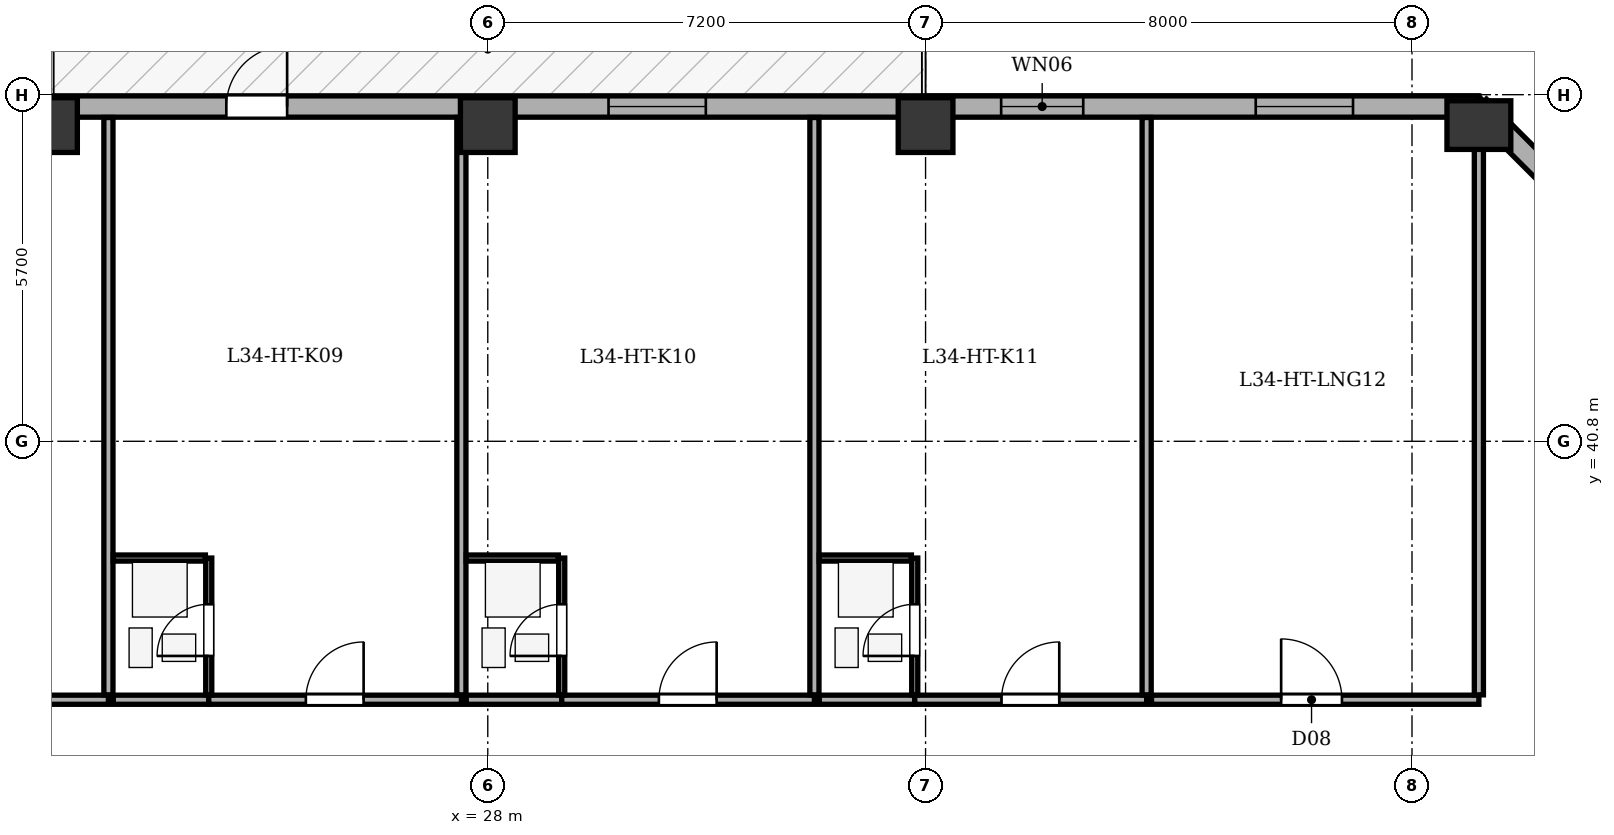
"""IFC4 building model, lengths in metres.
Left out: names, types, materials, properties, quantities, classifications, styles, units other than length and angle.
Written with IfcOpenShell. Run it as: python <this file> out.ifc"""

import sys

from ifc_helpers import new_model, si_unit, direction, frame, frame_2d, origin, origin_2d, place, context, subcontext, project, spatial, rectangle, extrude, element, fill, save


model = new_model("IFC4")
c1 = context("Model", 3, precision=1e-05, world=origin(), true_north=direction((0.0, 1.0)))
c2 = subcontext(c1, "Body", "Model", "MODEL_VIEW")
j1 = project(units=[si_unit("LENGTHUNIT", "METRE"), si_unit("PLANEANGLEUNIT", "RADIAN")], contexts=[c1])
p1 = place(None, origin())
s1 = spatial("IfcSite", under=j1, at=p1, CompositionType="ELEMENT")
p2 = place(p1, origin())
s2 = spatial("IfcBuilding", under=s1, at=p2, CompositionType="ELEMENT")
p3 = place(p2, frame((0.0, 0.0, 137.8)))
s3 = spatial("IfcBuildingStorey", under=s2, at=p3, CompositionType="ELEMENT", Elevation=137.8)
for number, where, z_axis, x_axis in (
    (1, (20.8, 46.0, 0.0), (0.0, 0.0, 1.0), (1.0, 0.0, 0.0)),
    (2, (28.0, 46.0, 0.0), (0.0, 0.0, 1.0), (1.0, 0.0, 0.0)),
    (3, (35.2, 46.0, 0.0), (0.0, 0.0, 1.0), (1.0, 0.0, 0.0)),
):
    element("IfcColumn", number, at=place(p3, frame(where, z_axis=z_axis, x_axis=x_axis)), inside=s3, PredefinedType="COLUMN", context=c2, shape_type="SweptSolid", body=[
        extrude(rectangle(XDim=0.9, YDim=0.9, at=origin_2d()), origin(), (0.0, 0.0, 1.0), 3.5),
    ])
p4 = place(p3, frame((44.3, 46.0, 0.0), z_axis=(0.0, 0.0, 1.0), x_axis=(1.0, 0.0, 0.0)))
e4 = element("IfcColumn", 4, at=p4, inside=s3, PredefinedType="COLUMN", context=c2, shape_type="SweptSolid", body=[
    extrude(rectangle(XDim=0.8, YDim=1.05, at=origin_2d()), origin(), (0.0, 0.0, 1.0), 3.5),
])
p5 = place(p3, frame((9.3, 46.305, 0.0), z_axis=(0.0, 0.0, 1.0), x_axis=(1.0, 0.0, 0.0)))
e5 = element("IfcWall", 5, at=p5, inside=s3, PredefinedType="STANDARD", context=c2, shape_type="SweptSolid", body=[
    extrude(rectangle(XDim=35.0, YDim=0.35, at=frame_2d((17.5, 0.0))), origin(), (0.0, 0.0, 1.0), 2.435),
])
p6 = place(p5, frame((14.4, 0.0, 0.0)))
e6 = element("IfcOpeningElement", 6, at=p6, cuts=e5, PredefinedType="OPENING", context=c2, shape_type="SweptSolid", body=[
    extrude(rectangle(XDim=1.0, YDim=2.02, at=frame_2d((0.5, 1.01))), frame((0.0, 0.185, 0.0), z_axis=(0.0, -1.0, 0.0), x_axis=(1.0, 0.0, 0.0)), (0.0, 0.0, 1.0), 0.37),
])
p7 = place(p5, frame((2.8, 0.0, 0.75)))
e7 = element("IfcOpeningElement", 7, at=p7, cuts=e5, PredefinedType="OPENING", context=c2, shape_type="SweptSolid", body=[
    extrude(rectangle(XDim=1.6, YDim=1.565, at=frame_2d((0.8, 0.782))), frame((0.0, 0.185, 0.0), z_axis=(0.0, -1.0, 0.0), x_axis=(1.0, 0.0, 0.0)), (0.0, 0.0, 1.0), 0.37),
])
p8 = place(p5, frame((8.178, 0.0, 0.75)))
e8 = element("IfcOpeningElement", 8, at=p8, cuts=e5, PredefinedType="OPENING", context=c2, shape_type="SweptSolid", body=[
    extrude(rectangle(XDim=1.6, YDim=1.565, at=frame_2d((0.8, 0.782))), frame((0.0, 0.185, 0.0), z_axis=(0.0, -1.0, 0.0), x_axis=(1.0, 0.0, 0.0)), (0.0, 0.0, 1.0), 0.37),
])
p9 = place(p5, frame((20.686, 0.0, 0.75)))
e9 = element("IfcOpeningElement", 9, at=p9, cuts=e5, PredefinedType="OPENING", context=c2, shape_type="SweptSolid", body=[
    extrude(rectangle(XDim=1.6, YDim=1.565, at=frame_2d((0.8, 0.782))), frame((0.0, 0.185, 0.0), z_axis=(0.0, -1.0, 0.0), x_axis=(1.0, 0.0, 0.0)), (0.0, 0.0, 1.0), 0.37),
])
p10 = place(p5, frame((27.143, 0.0, 0.75)))
e10 = element("IfcOpeningElement", 10, at=p10, cuts=e5, PredefinedType="OPENING", context=c2, shape_type="SweptSolid", body=[
    extrude(rectangle(XDim=1.35, YDim=1.565, at=frame_2d((0.675, 0.782))), frame((0.0, 0.185, 0.0), z_axis=(0.0, -1.0, 0.0), x_axis=(1.0, 0.0, 0.0)), (0.0, 0.0, 1.0), 0.37),
])
p11 = place(p5, frame((31.33, 0.0, 0.75)))
e11 = element("IfcOpeningElement", 11, at=p11, cuts=e5, PredefinedType="OPENING", context=c2, shape_type="SweptSolid", body=[
    extrude(rectangle(XDim=1.6, YDim=1.565, at=frame_2d((0.8, 0.782))), frame((0.0, 0.185, 0.0), z_axis=(0.0, -1.0, 0.0), x_axis=(1.0, 0.0, 0.0)), (0.0, 0.0, 1.0), 0.37),
])
p12 = place(p3, frame((44.3, 46.305, 0.0), z_axis=(0.0, 0.0, 1.0), x_axis=(0.707106781187, -0.707106781187, 0.0)))
e12 = element("IfcWall", 12, at=p12, inside=s3, PredefinedType="STANDARD", context=c2, shape_type="SweptSolid", body=[
    extrude(rectangle(XDim=6.795, YDim=0.35, at=frame_2d((3.397, 0.0))), origin(), (0.0, 0.0, 1.0), 2.435),
])
p13 = place(p12, frame((2.698, 0.0, 0.75)))
e13 = element("IfcOpeningElement", 13, at=p13, cuts=e12, PredefinedType="OPENING", context=c2, shape_type="SweptSolid", body=[
    extrude(rectangle(XDim=1.4, YDim=1.565, at=frame_2d((0.7, 0.782))), frame((0.0, 0.185, 0.0), z_axis=(0.0, -1.0, 0.0), x_axis=(1.0, 0.0, 0.0)), (0.0, 0.0, 1.0), 0.37),
])
p14 = place(p3, frame((17.606, 36.55, 0.0), z_axis=(0.0, 0.0, 1.0), x_axis=(1.0, 0.0, 0.0)))
e14 = element("IfcWall", 14, at=p14, inside=s3, PredefinedType="PARTITIONING", context=c2, shape_type="SweptSolid", body=[
    extrude(rectangle(XDim=4.155, YDim=0.15, at=frame_2d((2.078, 0.0))), origin(), (0.0, 0.0, 1.0), 3.05),
])
p15 = place(p14, frame((1.597, 0.0, 0.0)))
e15 = element("IfcOpeningElement", 15, at=p15, cuts=e14, PredefinedType="OPENING", context=c2, shape_type="SweptSolid", body=[
    extrude(rectangle(XDim=0.95, YDim=2.1, at=frame_2d((0.475, 1.05))), frame((0.0, 0.085, 0.0), z_axis=(0.0, -1.0, 0.0), x_axis=(1.0, 0.0, 0.0)), (0.0, 0.0, 1.0), 0.17),
])
p16 = place(p3, frame((21.761, 36.63, 0.0), z_axis=(0.0, 0.0, 1.0), x_axis=(0.0, 1.0, 0.0)))
e16 = element("IfcWall", 16, at=p16, inside=s3, PredefinedType="PARTITIONING", context=c2, shape_type="SweptSolid", body=[
    extrude(rectangle(XDim=9.495, YDim=0.15, at=frame_2d((4.748, 0.0))), origin(), (0.0, 0.0, 1.0), 3.05),
])
p17 = place(p3, frame((21.841, 36.55, 0.0), z_axis=(0.0, 0.0, 1.0), x_axis=(1.0, 0.0, 0.0)))
e17 = element("IfcWall", 17, at=p17, inside=s3, PredefinedType="PARTITIONING", context=c2, shape_type="SweptSolid", body=[
    extrude(rectangle(XDim=1.57, YDim=0.15, at=frame_2d((0.785, 0.0))), origin(), (0.0, 0.0, 1.0), 3.05),
])
p18 = place(p3, frame((23.411, 36.55, 0.0), z_axis=(0.0, 0.0, 1.0), x_axis=(1.0, 0.0, 0.0)))
e18 = element("IfcWall", 18, at=p18, inside=s3, PredefinedType="PARTITIONING", context=c2, shape_type="SweptSolid", body=[
    extrude(rectangle(XDim=4.155, YDim=0.15, at=frame_2d((2.078, 0.0))), origin(), (0.0, 0.0, 1.0), 3.05),
])
p19 = place(p18, frame((1.597, 0.0, 0.0)))
e19 = element("IfcOpeningElement", 19, at=p19, cuts=e18, PredefinedType="OPENING", context=c2, shape_type="SweptSolid", body=[
    extrude(rectangle(XDim=0.95, YDim=2.1, at=frame_2d((0.475, 1.05))), frame((0.0, 0.085, 0.0), z_axis=(0.0, -1.0, 0.0), x_axis=(1.0, 0.0, 0.0)), (0.0, 0.0, 1.0), 0.17),
])
p20 = place(p3, frame((23.411, 36.63, 0.0), z_axis=(0.0, 0.0, 1.0), x_axis=(0.0, 1.0, 0.0)))
e20 = element("IfcWall", 20, at=p20, inside=s3, PredefinedType="PARTITIONING", context=c2, shape_type="SweptSolid", body=[
    extrude(rectangle(XDim=2.25, YDim=0.1, at=frame_2d((1.125, 0.0))), origin(), (0.0, 0.0, 1.0), 3.05),
])
p21 = place(p20, frame((0.64, 0.0, 0.0)))
e21 = element("IfcOpeningElement", 21, at=p21, cuts=e20, PredefinedType="OPENING", context=c2, shape_type="SweptSolid", body=[
    extrude(rectangle(XDim=0.85, YDim=2.05, at=frame_2d((0.425, 1.025))), frame((0.0, 0.06, 0.0), z_axis=(0.0, -1.0, 0.0), x_axis=(1.0, 0.0, 0.0)), (0.0, 0.0, 1.0), 0.12),
])
p22 = place(p3, frame((21.841, 38.88, 0.0), z_axis=(0.0, 0.0, 1.0), x_axis=(1.0, 0.0, 0.0)))
e22 = element("IfcWall", 22, at=p22, inside=s3, PredefinedType="PARTITIONING", context=c2, shape_type="SweptSolid", body=[
    extrude(rectangle(XDim=1.515, YDim=0.1, at=frame_2d((0.757, 0.0))), origin(), (0.0, 0.0, 1.0), 3.05),
])
p23 = place(p3, frame((27.566, 36.63, 0.0), z_axis=(0.0, 0.0, 1.0), x_axis=(0.0, 1.0, 0.0)))
e23 = element("IfcWall", 23, at=p23, inside=s3, PredefinedType="PARTITIONING", context=c2, shape_type="SweptSolid", body=[
    extrude(rectangle(XDim=9.495, YDim=0.15, at=frame_2d((4.748, 0.0))), origin(), (0.0, 0.0, 1.0), 3.05),
])
p24 = place(p3, frame((27.646, 36.55, 0.0), z_axis=(0.0, 0.0, 1.0), x_axis=(1.0, 0.0, 0.0)))
e24 = element("IfcWall", 24, at=p24, inside=s3, PredefinedType="PARTITIONING", context=c2, shape_type="SweptSolid", body=[
    extrude(rectangle(XDim=1.57, YDim=0.15, at=frame_2d((0.785, 0.0))), origin(), (0.0, 0.0, 1.0), 3.05),
])
p25 = place(p3, frame((29.216, 36.55, 0.0), z_axis=(0.0, 0.0, 1.0), x_axis=(1.0, 0.0, 0.0)))
e25 = element("IfcWall", 25, at=p25, inside=s3, PredefinedType="PARTITIONING", context=c2, shape_type="SweptSolid", body=[
    extrude(rectangle(XDim=4.156, YDim=0.15, at=frame_2d((2.078, 0.0))), origin(), (0.0, 0.0, 1.0), 3.05),
])
p26 = place(p25, frame((1.598, 0.0, 0.0)))
e26 = element("IfcOpeningElement", 26, at=p26, cuts=e25, PredefinedType="OPENING", context=c2, shape_type="SweptSolid", body=[
    extrude(rectangle(XDim=0.95, YDim=2.1, at=frame_2d((0.475, 1.05))), frame((0.0, 0.085, 0.0), z_axis=(0.0, -1.0, 0.0), x_axis=(1.0, 0.0, 0.0)), (0.0, 0.0, 1.0), 0.17),
])
p27 = place(p3, frame((29.216, 36.63, 0.0), z_axis=(0.0, 0.0, 1.0), x_axis=(0.0, 1.0, 0.0)))
e27 = element("IfcWall", 27, at=p27, inside=s3, PredefinedType="PARTITIONING", context=c2, shape_type="SweptSolid", body=[
    extrude(rectangle(XDim=2.25, YDim=0.1, at=frame_2d((1.125, 0.0))), origin(), (0.0, 0.0, 1.0), 3.05),
])
p28 = place(p27, frame((0.64, 0.0, 0.0)))
e28 = element("IfcOpeningElement", 28, at=p28, cuts=e27, PredefinedType="OPENING", context=c2, shape_type="SweptSolid", body=[
    extrude(rectangle(XDim=0.85, YDim=2.05, at=frame_2d((0.425, 1.025))), frame((0.0, 0.06, 0.0), z_axis=(0.0, -1.0, 0.0), x_axis=(1.0, 0.0, 0.0)), (0.0, 0.0, 1.0), 0.12),
])
p29 = place(p3, frame((27.646, 38.88, 0.0), z_axis=(0.0, 0.0, 1.0), x_axis=(1.0, 0.0, 0.0)))
e29 = element("IfcWall", 29, at=p29, inside=s3, PredefinedType="PARTITIONING", context=c2, shape_type="SweptSolid", body=[
    extrude(rectangle(XDim=1.515, YDim=0.1, at=frame_2d((0.757, 0.0))), origin(), (0.0, 0.0, 1.0), 3.05),
])
p30 = place(p3, frame((33.372, 36.63, 0.0), z_axis=(0.0, 0.0, 1.0), x_axis=(0.0, 1.0, 0.0)))
e30 = element("IfcWall", 30, at=p30, inside=s3, PredefinedType="PARTITIONING", context=c2, shape_type="SweptSolid", body=[
    extrude(rectangle(XDim=9.495, YDim=0.15, at=frame_2d((4.748, 0.0))), origin(), (0.0, 0.0, 1.0), 2.485),
])
p31 = place(p3, frame((33.452, 36.55, 0.0), z_axis=(0.0, 0.0, 1.0), x_axis=(1.0, 0.0, 0.0)))
e31 = element("IfcWall", 31, at=p31, inside=s3, PredefinedType="PARTITIONING", context=c2, shape_type="SweptSolid", body=[
    extrude(rectangle(XDim=1.57, YDim=0.15, at=frame_2d((0.785, 0.0))), origin(), (0.0, 0.0, 1.0), 3.05),
])
p32 = place(p3, frame((35.022, 36.55, 0.0), z_axis=(0.0, 0.0, 1.0), x_axis=(1.0, 0.0, 0.0)))
e32 = element("IfcWall", 32, at=p32, inside=s3, PredefinedType="PARTITIONING", context=c2, shape_type="SweptSolid", body=[
    extrude(rectangle(XDim=3.814, YDim=0.15, at=frame_2d((1.907, 0.0))), origin(), (0.0, 0.0, 1.0), 3.05),
])
p33 = place(p32, frame((1.427, 0.0, 0.0)))
e33 = element("IfcOpeningElement", 33, at=p33, cuts=e32, PredefinedType="OPENING", context=c2, shape_type="SweptSolid", body=[
    extrude(rectangle(XDim=0.95, YDim=2.1, at=frame_2d((0.475, 1.05))), frame((0.0, 0.085, 0.0), z_axis=(0.0, -1.0, 0.0), x_axis=(1.0, 0.0, 0.0)), (0.0, 0.0, 1.0), 0.17),
])
p34 = place(p3, frame((35.022, 36.63, 0.0), z_axis=(0.0, 0.0, 1.0), x_axis=(0.0, 1.0, 0.0)))
e34 = element("IfcWall", 34, at=p34, inside=s3, PredefinedType="PARTITIONING", context=c2, shape_type="SweptSolid", body=[
    extrude(rectangle(XDim=2.25, YDim=0.1, at=frame_2d((1.125, 0.0))), origin(), (0.0, 0.0, 1.0), 2.235),
])
p35 = place(p34, frame((0.64, 0.0, 0.0)))
e35 = element("IfcOpeningElement", 35, at=p35, cuts=e34, PredefinedType="OPENING", context=c2, shape_type="SweptSolid", body=[
    extrude(rectangle(XDim=0.85, YDim=2.05, at=frame_2d((0.425, 1.025))), frame((0.0, 0.06, 0.0), z_axis=(0.0, -1.0, 0.0), x_axis=(1.0, 0.0, 0.0)), (0.0, 0.0, 1.0), 0.12),
])
p36 = place(p3, frame((33.452, 38.88, 0.0), z_axis=(0.0, 0.0, 1.0), x_axis=(1.0, 0.0, 0.0)))
e36 = element("IfcWall", 36, at=p36, inside=s3, PredefinedType="PARTITIONING", context=c2, shape_type="SweptSolid", body=[
    extrude(rectangle(XDim=1.515, YDim=0.1, at=frame_2d((0.758, 0.0))), origin(), (0.0, 0.0, 1.0), 3.05),
])
p37 = place(p3, frame((38.836, 36.63, 0.0), z_axis=(0.0, 0.0, 1.0), x_axis=(0.0, 1.0, 0.0)))
e37 = element("IfcWall", 37, at=p37, inside=s3, PredefinedType="PARTITIONING", context=c2, shape_type="SweptSolid", body=[
    extrude(rectangle(XDim=9.495, YDim=0.15, at=frame_2d((4.748, 0.0))), origin(), (0.0, 0.0, 1.0), 3.05),
])
p38 = place(p3, frame((38.916, 36.55, 0.0), z_axis=(0.0, 0.0, 1.0), x_axis=(1.0, 0.0, 0.0)))
e38 = element("IfcWall", 38, at=p38, inside=s3, PredefinedType="PARTITIONING", context=c2, shape_type="SweptSolid", body=[
    extrude(rectangle(XDim=5.384, YDim=0.15, at=frame_2d((2.692, 0.0))), origin(), (0.0, 0.0, 1.0), 3.05),
])
p39 = place(p38, frame((2.132, 0.0, 0.0)))
e39 = element("IfcOpeningElement", 39, at=p39, cuts=e38, PredefinedType="OPENING", context=c2, shape_type="SweptSolid", body=[
    extrude(rectangle(XDim=1.0, YDim=2.1, at=frame_2d((0.5, 1.05))), frame((0.0, 0.085, 0.0), z_axis=(0.0, -1.0, 0.0), x_axis=(1.0, 0.0, 0.0)), (0.0, 0.0, 1.0), 0.17),
])
p40 = place(p3, frame((44.3, 36.63, 0.0), z_axis=(0.0, 0.0, 1.0), x_axis=(0.0, 1.0, 0.0)))
e40 = element("IfcWall", 40, at=p40, inside=s3, PredefinedType="PARTITIONING", context=c2, shape_type="SweptSolid", body=[
    extrude(rectangle(XDim=9.495, YDim=0.15, at=frame_2d((4.748, 0.0))), origin(), (0.0, 0.0, 1.0), 3.05),
])
p41 = place(p6, origin())
e41 = element("IfcDoor", 41, at=p41, inside=s3, OperationType="SINGLE_SWING_RIGHT", PredefinedType="DOOR", context=c2, shape_type="SweptSolid", body=[
    extrude(rectangle(XDim=1.0, YDim=2.02, at=frame_2d((0.5, 1.01))), frame((0.0, 0.025, 0.0), z_axis=(0.0, -1.0, 0.0), x_axis=(1.0, 0.0, 0.0)), (0.0, 0.0, 1.0), 0.05),
])
fill(e6, e41)
p42 = place(p9, origin())
e42 = element("IfcWindow", 42, at=p42, inside=s3, PartitioningType="SINGLE_PANEL", PredefinedType="WINDOW", context=c2, shape_type="SweptSolid", body=[
    extrude(rectangle(XDim=1.6, YDim=1.565, at=frame_2d((0.8, 0.782))), frame((0.0, -0.01, 0.0), z_axis=(0.0, -1.0, 0.0), x_axis=(1.0, 0.0, 0.0)), (0.0, 0.0, 1.0), 0.06),
])
fill(e9, e42)
p43 = place(p10, origin())
e43 = element("IfcWindow", 43, at=p43, inside=s3, PartitioningType="SINGLE_PANEL", PredefinedType="WINDOW", context=c2, shape_type="SweptSolid", body=[
    extrude(rectangle(XDim=1.35, YDim=1.565, at=frame_2d((0.675, 0.782))), frame((0.0, -0.01, 0.0), z_axis=(0.0, -1.0, 0.0), x_axis=(1.0, 0.0, 0.0)), (0.0, 0.0, 1.0), 0.06),
])
fill(e10, e43)
p44 = place(p11, origin())
e44 = element("IfcWindow", 44, at=p44, inside=s3, PartitioningType="SINGLE_PANEL", PredefinedType="WINDOW", context=c2, shape_type="SweptSolid", body=[
    extrude(rectangle(XDim=1.6, YDim=1.565, at=frame_2d((0.8, 0.782))), frame((0.0, -0.01, 0.0), z_axis=(0.0, -1.0, 0.0), x_axis=(1.0, 0.0, 0.0)), (0.0, 0.0, 1.0), 0.06),
])
fill(e11, e44)
p45 = place(p21, origin())
e45 = element("IfcDoor", 45, at=p45, inside=s3, OperationType="SINGLE_SWING_LEFT", PredefinedType="DOOR", context=c2, shape_type="SweptSolid", body=[
    extrude(rectangle(XDim=0.85, YDim=2.05, at=frame_2d((0.425, 1.025))), frame((0.0, 0.025, 0.0), z_axis=(0.0, -1.0, 0.0), x_axis=(1.0, 0.0, 0.0)), (0.0, 0.0, 1.0), 0.05),
])
fill(e21, e45)
p46 = place(p19, origin())
e46 = element("IfcDoor", 46, at=p46, inside=s3, OperationType="SINGLE_SWING_RIGHT", PredefinedType="DOOR", context=c2, shape_type="SweptSolid", body=[
    extrude(rectangle(XDim=0.95, YDim=2.1, at=frame_2d((0.475, 1.05))), frame((0.0, 0.025, 0.0), z_axis=(0.0, -1.0, 0.0), x_axis=(1.0, 0.0, 0.0)), (0.0, 0.0, 1.0), 0.05),
])
fill(e19, e46)
p47 = place(p28, origin())
e47 = element("IfcDoor", 47, at=p47, inside=s3, OperationType="SINGLE_SWING_LEFT", PredefinedType="DOOR", context=c2, shape_type="SweptSolid", body=[
    extrude(rectangle(XDim=0.85, YDim=2.05, at=frame_2d((0.425, 1.025))), frame((0.0, 0.025, 0.0), z_axis=(0.0, -1.0, 0.0), x_axis=(1.0, 0.0, 0.0)), (0.0, 0.0, 1.0), 0.05),
])
fill(e28, e47)
p48 = place(p26, origin())
e48 = element("IfcDoor", 48, at=p48, inside=s3, OperationType="SINGLE_SWING_RIGHT", PredefinedType="DOOR", context=c2, shape_type="SweptSolid", body=[
    extrude(rectangle(XDim=0.95, YDim=2.1, at=frame_2d((0.475, 1.05))), frame((0.0, 0.025, 0.0), z_axis=(0.0, -1.0, 0.0), x_axis=(1.0, 0.0, 0.0)), (0.0, 0.0, 1.0), 0.05),
])
fill(e26, e48)
p49 = place(p35, origin())
e49 = element("IfcDoor", 49, at=p49, inside=s3, OperationType="SINGLE_SWING_LEFT", PredefinedType="DOOR", context=c2, shape_type="SweptSolid", body=[
    extrude(rectangle(XDim=0.85, YDim=2.05, at=frame_2d((0.425, 1.025))), frame((0.0, 0.025, 0.0), z_axis=(0.0, -1.0, 0.0), x_axis=(1.0, 0.0, 0.0)), (0.0, 0.0, 1.0), 0.05),
])
fill(e35, e49)
p50 = place(p33, origin())
e50 = element("IfcDoor", 50, at=p50, inside=s3, OperationType="SINGLE_SWING_RIGHT", PredefinedType="DOOR", context=c2, shape_type="SweptSolid", body=[
    extrude(rectangle(XDim=0.95, YDim=2.1, at=frame_2d((0.475, 1.05))), frame((0.0, 0.025, 0.0), z_axis=(0.0, -1.0, 0.0), x_axis=(1.0, 0.0, 0.0)), (0.0, 0.0, 1.0), 0.05),
])
fill(e33, e50)
p51 = place(p39, origin())
e51 = element("IfcDoor", 51, at=p51, inside=s3, OperationType="SINGLE_SWING_LEFT", PredefinedType="DOOR", context=c2, shape_type="SweptSolid", body=[
    extrude(rectangle(XDim=1.0, YDim=2.1, at=frame_2d((0.5, 1.05))), frame((0.0, 0.025, 0.0), z_axis=(0.0, -1.0, 0.0), x_axis=(1.0, 0.0, 0.0)), (0.0, 0.0, 1.0), 0.05),
])
fill(e39, e51)
save(model, sys.argv[1])
